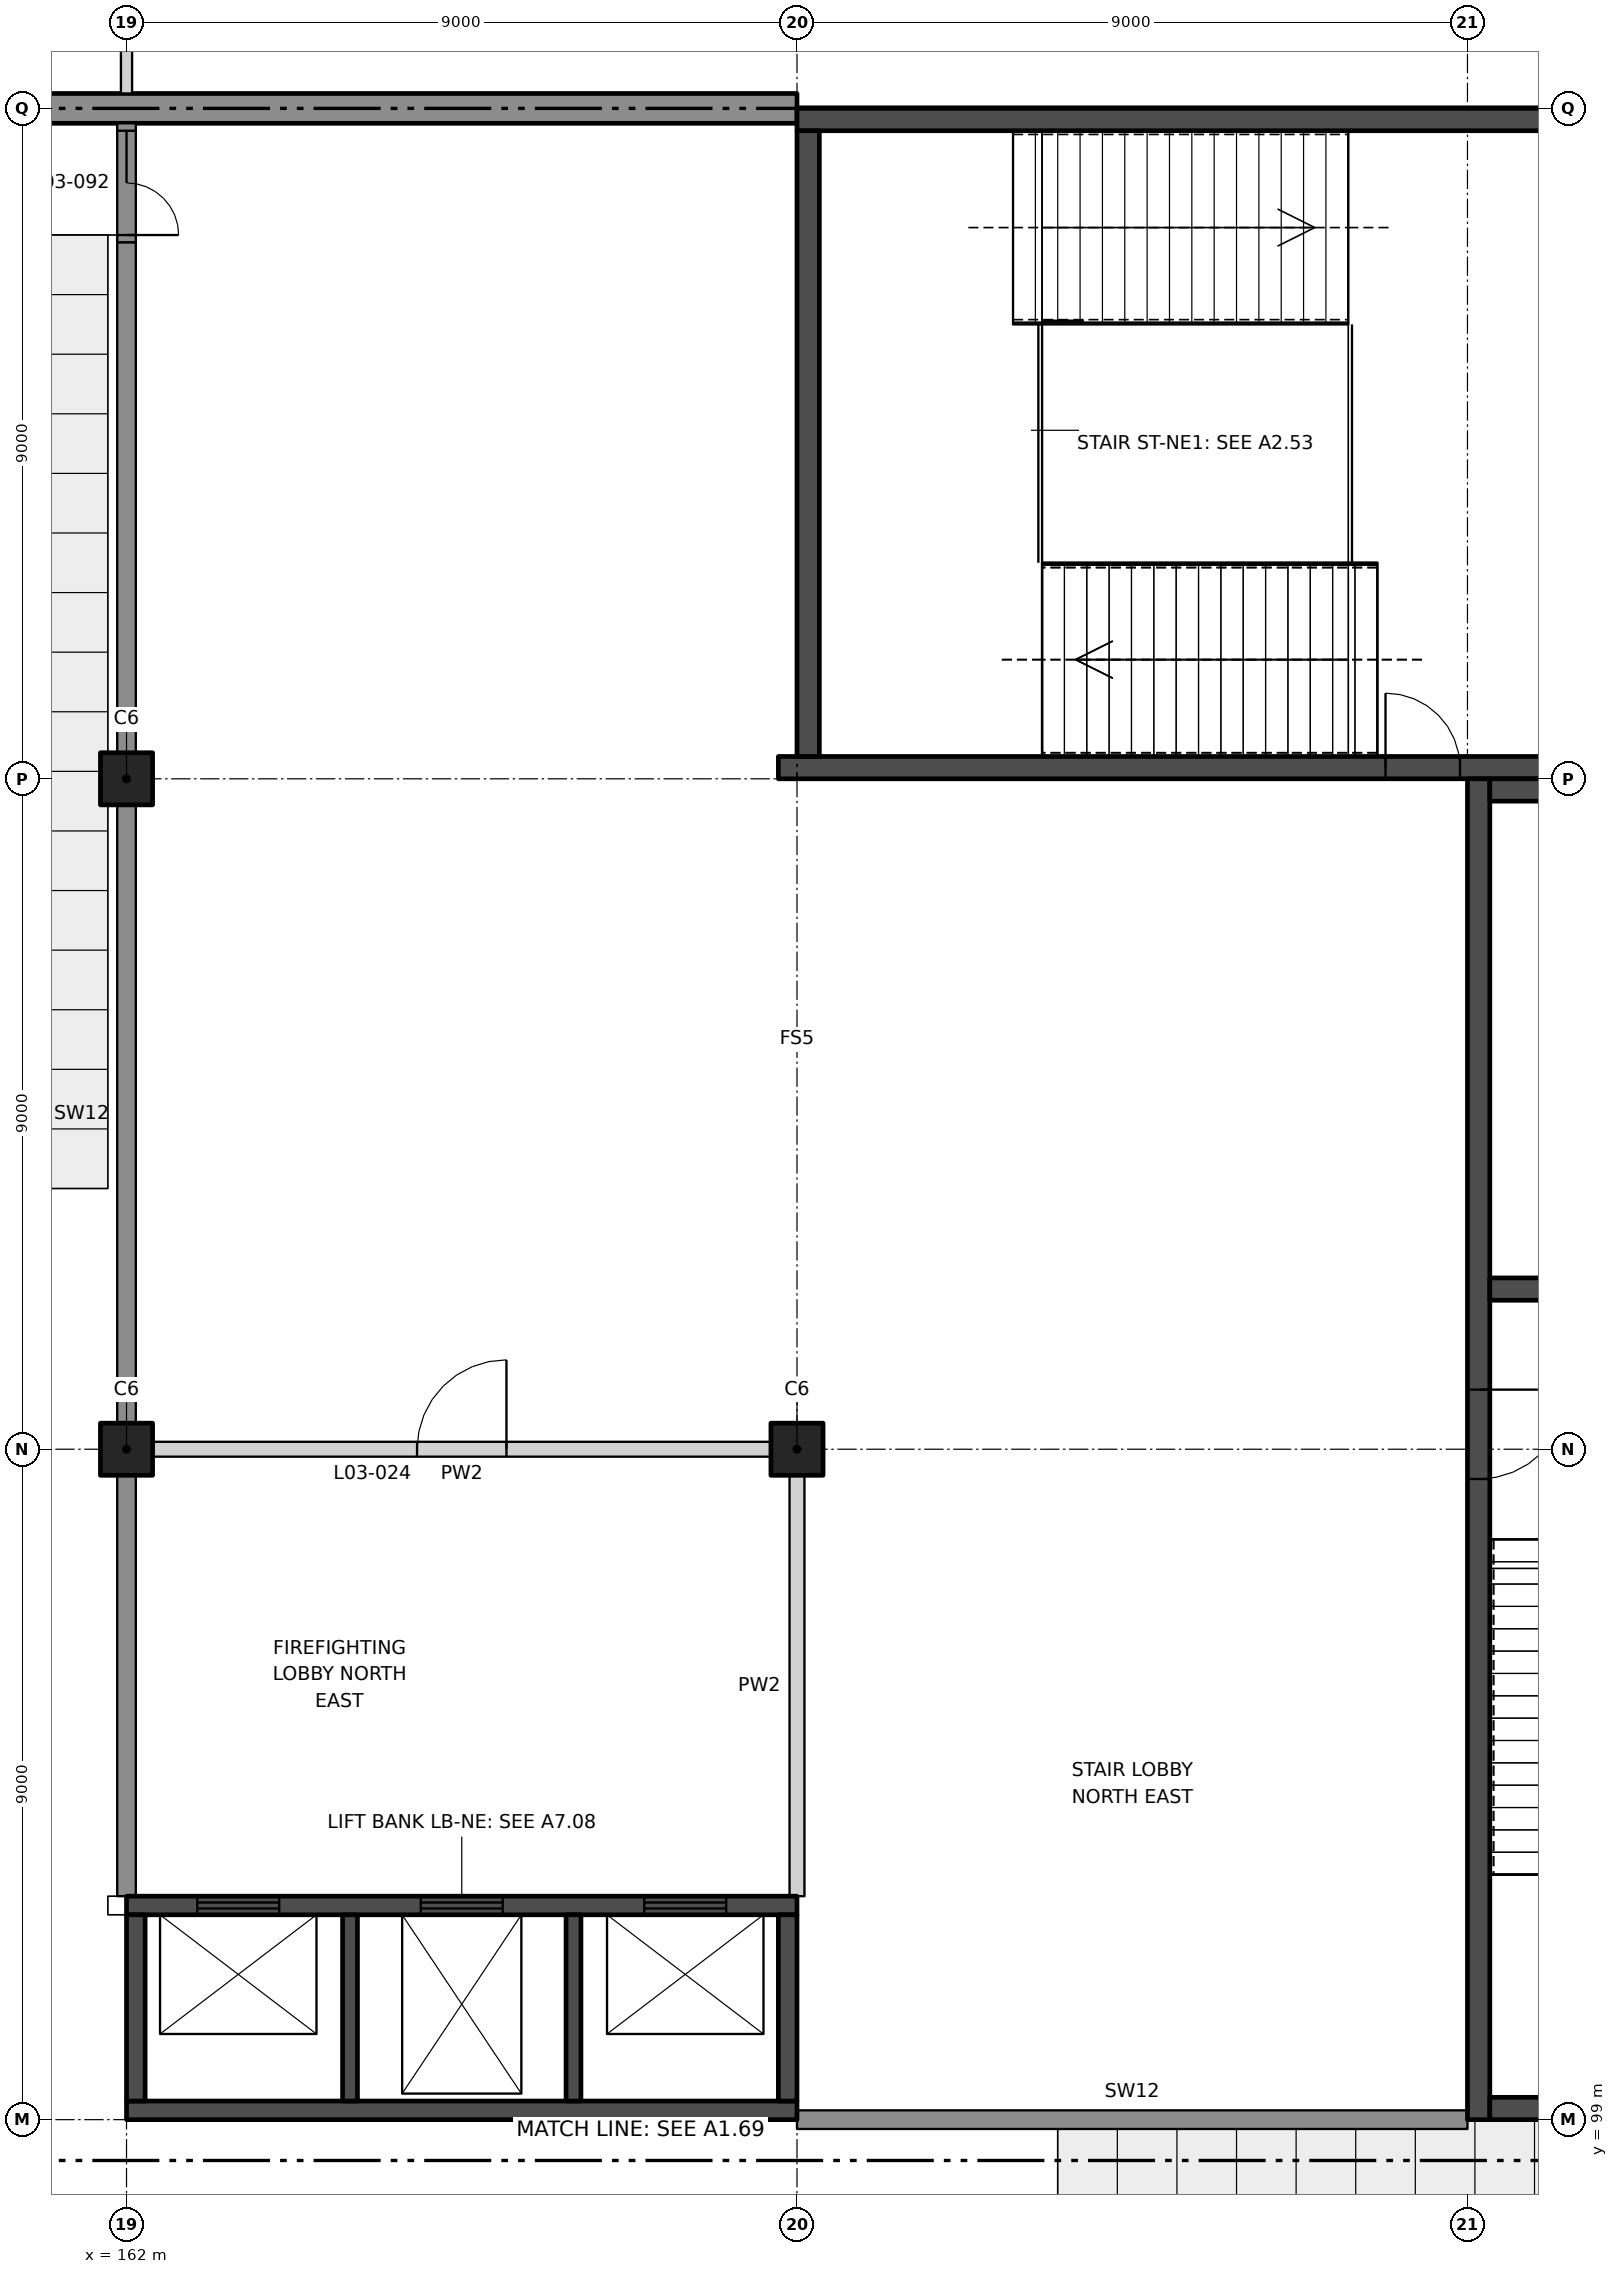
"""IFC4 building model, lengths in metres.
Left out: names, types, materials, properties, quantities, classifications, styles, units other than length and angle.
Written with IfcOpenShell. Run it as: python <this file> out.ifc"""

import sys

from ifc_helpers import new_model, si_unit, direction, frame, frame_2d, origin, origin_2d, place, context, subcontext, project, spatial, rectangle, extrude, element, fill, save


model = new_model("IFC4")
c1 = context("Model", 3, precision=1e-05, world=origin(), true_north=direction((0.0, 1.0)))
c2 = subcontext(c1, "Body", "Model", "MODEL_VIEW")
j1 = project(units=[si_unit("LENGTHUNIT", "METRE"), si_unit("PLANEANGLEUNIT", "RADIAN")], contexts=[c1])
p1 = place(None, origin())
s1 = spatial("IfcSite", under=j1, at=p1, CompositionType="ELEMENT")
p2 = place(p1, origin())
s2 = spatial("IfcBuilding", under=s1, at=p2, CompositionType="ELEMENT")
p3 = place(p2, frame((0.0, 0.0, 22.0)))
s3 = spatial("IfcBuildingStorey", under=s2, at=p3, CompositionType="ELEMENT", Elevation=22.0)
for number, where, z_axis, x_axis in (
    (1, (162.0, 108.0, 0.0), (0.0, 0.0, 1.0), (1.0, 0.0, 0.0)),
    (2, (162.0, 117.0, 0.0), (0.0, 0.0, 1.0), (1.0, 0.0, 0.0)),
    (3, (171.0, 108.0, 0.0), (0.0, 0.0, 1.0), (1.0, 0.0, 0.0)),
):
    element("IfcColumn", number, at=place(p3, frame(where, z_axis=z_axis, x_axis=x_axis)), inside=s3, PredefinedType="COLUMN", context=c2, shape_type="SweptSolid", body=[
        extrude(rectangle(XDim=0.7, YDim=0.7, at=origin_2d()), origin(), (0.0, 0.0, 1.0), 6.0),
    ])
p4 = place(p3, frame((171.0, 126.0, 0.0), z_axis=(0.0, 0.0, 1.0), x_axis=(-1.0, 0.0, 0.0)))
e4 = element("IfcWall", 4, at=p4, inside=s3, PredefinedType="SOLIDWALL", context=c2, shape_type="SweptSolid", body=[
    extrude(rectangle(XDim=25.2, YDim=0.4, at=frame_2d((12.6, 0.0))), origin(), (0.0, 0.0, 1.0), 6.0),
])
p5 = place(p3, frame((162.35, 108.0, 0.0), z_axis=(0.0, 0.0, 1.0), x_axis=(1.0, 0.0, 0.0)))
e5 = element("IfcWall", 5, at=p5, inside=s3, PredefinedType="PARTITIONING", context=c2, shape_type="SweptSolid", body=[
    extrude(rectangle(XDim=8.3, YDim=0.2, at=frame_2d((4.15, 0.0))), origin(), (0.0, 0.0, 1.0), 4.8),
])
p6 = place(p5, frame((3.55, 0.0, 0.0)))
e6 = element("IfcOpeningElement", 6, at=p6, cuts=e5, PredefinedType="OPENING", context=c2, shape_type="SweptSolid", body=[
    extrude(rectangle(XDim=1.2, YDim=2.1, at=frame_2d((0.6, 1.05))), frame((0.0, 0.11, 0.0), z_axis=(0.0, -1.0, 0.0), x_axis=(1.0, 0.0, 0.0)), (0.0, 0.0, 1.0), 0.22),
])
p7 = place(p3, frame((162.0, 126.2, 0.0), z_axis=(0.0, 0.0, 1.0), x_axis=(0.0, 1.0, 0.0)))
e7 = element("IfcWall", 7, at=p7, inside=s3, PredefinedType="PARTITIONING", context=c2, shape_type="SweptSolid", body=[
    extrude(rectangle(XDim=2.725, YDim=0.15, at=frame_2d((1.363, 0.0))), origin(), (0.0, 0.0, 1.0), 4.7),
])
p8 = place(p3, frame((171.0, 102.0, 0.0), z_axis=(0.0, 0.0, 1.0), x_axis=(0.0, 1.0, 0.0)))
e8 = element("IfcWall", 8, at=p8, inside=s3, PredefinedType="PARTITIONING", context=c2, shape_type="SweptSolid", body=[
    extrude(rectangle(XDim=5.65, YDim=0.2, at=frame_2d((2.825, 0.0))), origin(), (0.0, 0.0, 1.0), 5.0),
])
p9 = place(p3, frame((170.75, 117.15, 0.0), z_axis=(0.0, 0.0, 1.0), x_axis=(1.0, 0.0, 0.0)))
e9 = element("IfcWall", 9, at=p9, inside=s3, PredefinedType="SHEAR", context=c2, shape_type="SweptSolid", body=[
    extrude(rectangle(XDim=18.25, YDim=0.3, at=frame_2d((9.125, 0.0))), origin(), (0.0, 0.0, 1.0), 6.0),
])
p10 = place(p9, frame((8.15, 0.0, 0.0)))
e10 = element("IfcOpeningElement", 10, at=p10, cuts=e9, PredefinedType="OPENING", context=c2, shape_type="SweptSolid", body=[
    extrude(rectangle(XDim=1.0, YDim=2.1, at=frame_2d((0.5, 1.05))), frame((0.0, 0.16, 0.0), z_axis=(0.0, -1.0, 0.0), x_axis=(1.0, 0.0, 0.0)), (0.0, 0.0, 1.0), 0.32),
])
p11 = place(p3, frame((171.0, 125.85, 0.0), z_axis=(0.0, 0.0, 1.0), x_axis=(1.0, 0.0, 0.0)))
e11 = element("IfcWall", 11, at=p11, inside=s3, PredefinedType="SHEAR", context=c2, shape_type="SweptSolid", body=[
    extrude(rectangle(XDim=18.0, YDim=0.3, at=frame_2d((9.0, 0.0))), origin(), (0.0, 0.0, 1.0), 6.0),
])
p12 = place(p3, frame((171.15, 117.3, 0.0), z_axis=(0.0, 0.0, 1.0), x_axis=(0.0, 1.0, 0.0)))
e12 = element("IfcWall", 12, at=p12, inside=s3, PredefinedType="SHEAR", context=c2, shape_type="SweptSolid", body=[
    extrude(rectangle(XDim=8.4, YDim=0.3, at=frame_2d((4.2, 0.0))), origin(), (0.0, 0.0, 1.0), 6.0),
])
p13 = place(p3, frame((180.15, 99.0, 0.0), z_axis=(0.0, 0.0, 1.0), x_axis=(0.0, 1.0, 0.0)))
e13 = element("IfcWall", 13, at=p13, inside=s3, PredefinedType="SHEAR", context=c2, shape_type="SweptSolid", body=[
    extrude(rectangle(XDim=18.0, YDim=0.3, at=frame_2d((9.0, 0.0))), origin(), (0.0, 0.0, 1.0), 6.0),
])
p14 = place(p13, frame((8.6, 0.0, 0.0)))
e14 = element("IfcOpeningElement", 14, at=p14, cuts=e13, PredefinedType="OPENING", context=c2, shape_type="SweptSolid", body=[
    extrude(rectangle(XDim=1.2, YDim=2.1, at=frame_2d((0.6, 1.05))), frame((0.0, 0.16, 0.0), z_axis=(0.0, -1.0, 0.0), x_axis=(1.0, 0.0, 0.0)), (0.0, 0.0, 1.0), 0.32),
])
for number, where, z_axis, x_axis in (
    (15, (180.3, 99.15, 0.0), (0.0, 0.0, 1.0), (1.0, 0.0, 0.0)),
    (16, (180.3, 116.85, 0.0), (0.0, 0.0, 1.0), (1.0, 0.0, 0.0)),
    (17, (180.3, 110.15, 0.0), (0.0, 0.0, 1.0), (1.0, 0.0, 0.0)),
):
    element("IfcWall", number, at=place(p3, frame(where, z_axis=z_axis, x_axis=x_axis)), inside=s3, PredefinedType="SHEAR", context=c2, shape_type="SweptSolid", body=[
        extrude(rectangle(XDim=8.4, YDim=0.3, at=frame_2d((4.2, 0.0))), origin(), (0.0, 0.0, 1.0), 6.0),
    ])
p15 = place(p3, frame((162.0, 101.875, 0.0), z_axis=(0.0, 0.0, 1.0), x_axis=(1.0, 0.0, 0.0)))
e18 = element("IfcWall", 18, at=p15, inside=s3, PredefinedType="SHEAR", context=c2, shape_type="SweptSolid", body=[
    extrude(rectangle(XDim=9.0, YDim=0.25, at=frame_2d((4.5, 0.0))), origin(), (0.0, 0.0, 1.0), 6.0),
])
p16 = place(p15, frame((0.95, 0.0, 0.0)))
e19 = element("IfcOpeningElement", 19, at=p16, cuts=e18, PredefinedType="OPENING", context=c2, shape_type="SweptSolid", body=[
    extrude(rectangle(XDim=1.1, YDim=2.1, at=frame_2d((0.55, 1.05))), frame((0.0, 0.135, 0.0), z_axis=(0.0, -1.0, 0.0), x_axis=(1.0, 0.0, 0.0)), (0.0, 0.0, 1.0), 0.27),
])
p17 = place(p15, frame((3.95, 0.0, 0.0)))
e20 = element("IfcOpeningElement", 20, at=p17, cuts=e18, PredefinedType="OPENING", context=c2, shape_type="SweptSolid", body=[
    extrude(rectangle(XDim=1.1, YDim=2.1, at=frame_2d((0.55, 1.05))), frame((0.0, 0.135, 0.0), z_axis=(0.0, -1.0, 0.0), x_axis=(1.0, 0.0, 0.0)), (0.0, 0.0, 1.0), 0.27),
])
p18 = place(p15, frame((6.95, 0.0, 0.0)))
e21 = element("IfcOpeningElement", 21, at=p18, cuts=e18, PredefinedType="OPENING", context=c2, shape_type="SweptSolid", body=[
    extrude(rectangle(XDim=1.1, YDim=2.1, at=frame_2d((0.55, 1.05))), frame((0.0, 0.135, 0.0), z_axis=(0.0, -1.0, 0.0), x_axis=(1.0, 0.0, 0.0)), (0.0, 0.0, 1.0), 0.27),
])
p19 = place(p3, frame((162.0, 99.125, 0.0), z_axis=(0.0, 0.0, 1.0), x_axis=(1.0, 0.0, 0.0)))
e22 = element("IfcWall", 22, at=p19, inside=s3, PredefinedType="SHEAR", context=c2, shape_type="SweptSolid", body=[
    extrude(rectangle(XDim=9.0, YDim=0.25, at=frame_2d((4.5, 0.0))), origin(), (0.0, 0.0, 1.0), 6.0),
])
for number, where, z_axis, x_axis in (
    (23, (162.125, 99.25, 0.0), (0.0, 0.0, 1.0), (0.0, 1.0, 0.0)),
    (24, (170.875, 99.25, 0.0), (0.0, 0.0, 1.0), (0.0, 1.0, 0.0)),
):
    element("IfcWall", number, at=place(p3, frame(where, z_axis=z_axis, x_axis=x_axis)), inside=s3, PredefinedType="SHEAR", context=c2, shape_type="SweptSolid", body=[
        extrude(rectangle(XDim=2.5, YDim=0.25, at=frame_2d((1.25, 0.0))), origin(), (0.0, 0.0, 1.0), 6.0),
    ])
for number, where, z_axis, x_axis in (
    (25, (165.0, 99.25, 0.0), (0.0, 0.0, 1.0), (0.0, 1.0, 0.0)),
    (26, (168.0, 99.25, 0.0), (0.0, 0.0, 1.0), (0.0, 1.0, 0.0)),
):
    element("IfcWall", number, at=place(p3, frame(where, z_axis=z_axis, x_axis=x_axis)), inside=s3, PredefinedType="SHEAR", context=c2, shape_type="SweptSolid", body=[
        extrude(rectangle(XDim=2.5, YDim=0.2, at=frame_2d((1.25, 0.0))), origin(), (0.0, 0.0, 1.0), 6.0),
    ])
p20 = place(p3, frame((162.0, 124.2, 0.0), z_axis=(0.0, 0.0, 1.0), x_axis=(0.0, 1.0, 0.0)))
e27 = element("IfcWall", 27, at=p20, inside=s3, PredefinedType="SOLIDWALL", context=c2, shape_type="SweptSolid", body=[
    extrude(rectangle(XDim=1.6, YDim=0.25, at=frame_2d((0.8, 0.0))), origin(), (0.0, 0.0, 1.0), 4.8),
])
p21 = place(p20, frame((0.1, 0.0, 0.0)))
e28 = element("IfcOpeningElement", 28, at=p21, cuts=e27, PredefinedType="OPENING", context=c2, shape_type="SweptSolid", body=[
    extrude(rectangle(XDim=1.4, YDim=2.4, at=frame_2d((0.7, 1.2))), frame((0.0, 0.135, 0.0), z_axis=(0.0, -1.0, 0.0), x_axis=(1.0, 0.0, 0.0)), (0.0, 0.0, 1.0), 0.27),
])
p22 = place(p3, frame((162.0, 102.0, 0.0), z_axis=(0.0, 0.0, 1.0), x_axis=(0.0, 1.0, 0.0)))
e29 = element("IfcWall", 29, at=p22, inside=s3, PredefinedType="SOLIDWALL", context=c2, shape_type="SweptSolid", body=[
    extrude(rectangle(XDim=5.65, YDim=0.25, at=frame_2d((2.825, 0.0))), origin(), (0.0, 0.0, 1.0), 5.0),
])
p23 = place(p3, frame((162.0, 108.35, 0.0), z_axis=(0.0, 0.0, 1.0), x_axis=(0.0, 1.0, 0.0)))
e30 = element("IfcWall", 30, at=p23, inside=s3, PredefinedType="SOLIDWALL", context=c2, shape_type="SweptSolid", body=[
    extrude(rectangle(XDim=8.3, YDim=0.25, at=frame_2d((4.15, 0.0))), origin(), (0.0, 0.0, 1.0), 4.8),
])
p24 = place(p3, frame((162.0, 117.35, 0.0), z_axis=(0.0, 0.0, 1.0), x_axis=(0.0, 1.0, 0.0)))
e31 = element("IfcWall", 31, at=p24, inside=s3, PredefinedType="SOLIDWALL", context=c2, shape_type="SweptSolid", body=[
    extrude(rectangle(XDim=6.85, YDim=0.25, at=frame_2d((3.425, 0.0))), origin(), (0.0, 0.0, 1.0), 4.8),
])
p25 = place(p3, frame((171.0, 99.0, 0.0), z_axis=(0.0, 0.0, 1.0), x_axis=(1.0, 0.0, 0.0)))
e32 = element("IfcWall", 32, at=p25, inside=s3, PredefinedType="SOLIDWALL", context=c2, shape_type="SweptSolid", body=[
    extrude(rectangle(XDim=9.0, YDim=0.25, at=frame_2d((4.5, 0.0))), origin(), (0.0, 0.0, 1.0), 4.7),
])
p26 = place(p6, origin())
e33 = element("IfcDoor", 33, at=p26, inside=s3, OperationType="SINGLE_SWING_RIGHT", PredefinedType="DOOR", context=c2, shape_type="SweptSolid", body=[
    extrude(rectangle(XDim=1.2, YDim=2.1, at=frame_2d((0.6, 1.05))), frame((0.0, 0.025, 0.0), z_axis=(0.0, -1.0, 0.0), x_axis=(1.0, 0.0, 0.0)), (0.0, 0.0, 1.0), 0.05),
])
fill(e6, e33)
p27 = place(p10, origin())
e34 = element("IfcDoor", 34, at=p27, inside=s3, OperationType="SINGLE_SWING_LEFT", PredefinedType="DOOR", context=c2, shape_type="SweptSolid", body=[
    extrude(rectangle(XDim=1.0, YDim=2.1, at=frame_2d((0.5, 1.05))), frame((0.0, 0.025, 0.0), z_axis=(0.0, -1.0, 0.0), x_axis=(1.0, 0.0, 0.0)), (0.0, 0.0, 1.0), 0.05),
])
fill(e10, e34)
p28 = place(p14, frame((1.2, 0.0, 0.0), z_axis=(0.0, 0.0, 1.0), x_axis=(-1.0, 0.0, 0.0)))
e35 = element("IfcDoor", 35, at=p28, inside=s3, OperationType="SINGLE_SWING_LEFT", PredefinedType="DOOR", context=c2, shape_type="SweptSolid", body=[
    extrude(rectangle(XDim=1.2, YDim=2.1, at=frame_2d((0.6, 1.05))), frame((0.0, 0.025, 0.0), z_axis=(0.0, -1.0, 0.0), x_axis=(1.0, 0.0, 0.0)), (0.0, 0.0, 1.0), 0.05),
])
fill(e14, e35)
p29 = place(p16, origin())
e36 = element("IfcDoor", 36, at=p29, inside=s3, OperationType="DOUBLE_DOOR_SLIDING", PredefinedType="DOOR", context=c2, shape_type="SweptSolid", body=[
    extrude(rectangle(XDim=1.1, YDim=2.1, at=frame_2d((0.55, 1.05))), frame((0.0, 0.025, 0.0), z_axis=(0.0, -1.0, 0.0), x_axis=(1.0, 0.0, 0.0)), (0.0, 0.0, 1.0), 0.05),
])
fill(e19, e36)
p30 = place(p17, origin())
e37 = element("IfcDoor", 37, at=p30, inside=s3, OperationType="DOUBLE_DOOR_SLIDING", PredefinedType="DOOR", context=c2, shape_type="SweptSolid", body=[
    extrude(rectangle(XDim=1.1, YDim=2.1, at=frame_2d((0.55, 1.05))), frame((0.0, 0.025, 0.0), z_axis=(0.0, -1.0, 0.0), x_axis=(1.0, 0.0, 0.0)), (0.0, 0.0, 1.0), 0.05),
])
fill(e20, e37)
p31 = place(p18, origin())
e38 = element("IfcDoor", 38, at=p31, inside=s3, OperationType="DOUBLE_DOOR_SLIDING", PredefinedType="DOOR", context=c2, shape_type="SweptSolid", body=[
    extrude(rectangle(XDim=1.1, YDim=2.1, at=frame_2d((0.55, 1.05))), frame((0.0, 0.025, 0.0), z_axis=(0.0, -1.0, 0.0), x_axis=(1.0, 0.0, 0.0)), (0.0, 0.0, 1.0), 0.05),
])
fill(e21, e38)
p32 = place(p21, frame((1.4, 0.0, 0.0), z_axis=(0.0, 0.0, 1.0), x_axis=(-1.0, 0.0, 0.0)))
e39 = element("IfcDoor", 39, at=p32, inside=s3, OperationType="DOUBLE_DOOR_SINGLE_SWING", PredefinedType="DOOR", context=c2, shape_type="SweptSolid", body=[
    extrude(rectangle(XDim=1.4, YDim=2.4, at=frame_2d((0.7, 1.2))), frame((0.0, 0.025, 0.0), z_axis=(0.0, -1.0, 0.0), x_axis=(1.0, 0.0, 0.0)), (0.0, 0.0, 1.0), 0.05),
])
fill(e28, e39)
save(model, sys.argv[1])
